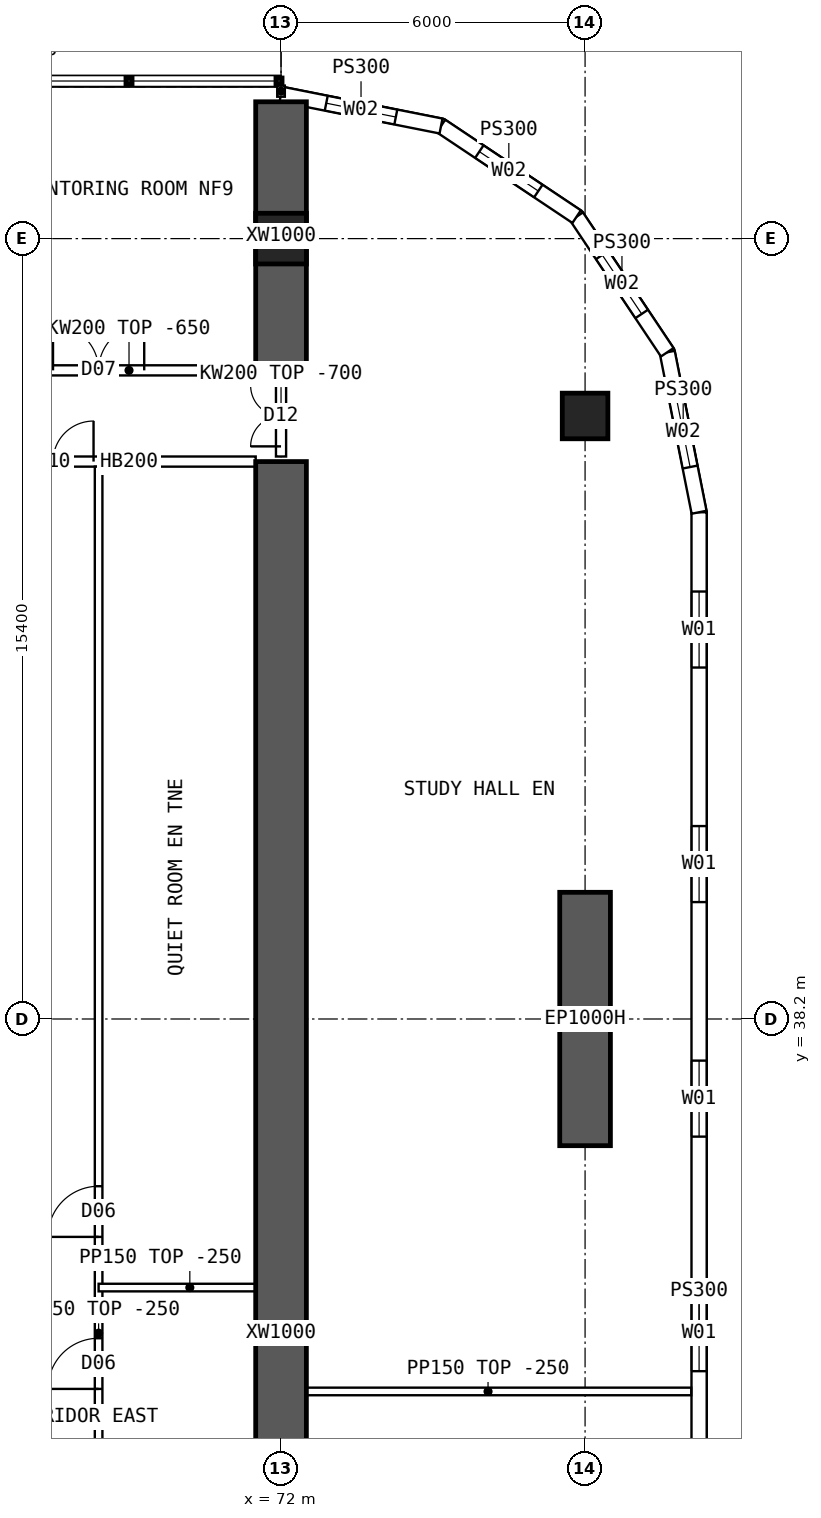
"""IFC4 building model, lengths in metres.
Left out: names, types, materials, properties, quantities, classifications, styles, units other than length and angle.
Written with IfcOpenShell. Run it as: python <this file> out.ifc"""

import sys

from ifc_helpers import new_model, si_unit, direction, frame, frame_2d, origin, origin_2d, place, context, subcontext, project, spatial, polyline, rectangle, hollow_rectangle, outline, extrude, element, fill, save


model = new_model("IFC4")
c1 = context("Model", 3, precision=1e-05, world=origin(), true_north=direction((0.0, 1.0)))
c2 = subcontext(c1, "Body", "Model", "MODEL_VIEW")
j1 = project(units=[si_unit("LENGTHUNIT", "METRE"), si_unit("PLANEANGLEUNIT", "RADIAN")], contexts=[c1])
p1 = place(None, origin())
s1 = spatial("IfcSite", under=j1, at=p1, CompositionType="ELEMENT")
p2 = place(p1, origin())
s2 = spatial("IfcBuilding", under=s1, at=p2, CompositionType="ELEMENT")
p3 = place(p2, frame((0.0, 0.0, 16.0)))
s3 = spatial("IfcBuildingStorey", under=s2, at=p3, CompositionType="ELEMENT", Elevation=16.0)
p4 = place(p3, frame((72.0, 53.6, 0.0), z_axis=(0.0, 0.0, 1.0), x_axis=(1.0, 0.0, 0.0)))
e1 = element("IfcColumn", 1, at=p4, inside=s3, PredefinedType="COLUMN", context=c2, shape_type="SweptSolid", body=[
    extrude(hollow_rectangle(XDim=1.0, YDim=1.0, WallThickness=0.1, at=origin_2d()), origin(), (0.0, 0.0, 1.0), 4.2),
])
p5 = place(p3, frame((78.0, 50.1, 0.0), z_axis=(0.0, 0.0, 1.0), x_axis=(1.0, 0.0, 0.0)))
e2 = element("IfcColumn", 2, at=p5, inside=s3, PredefinedType="COLUMN", context=c2, shape_type="SweptSolid", body=[
    extrude(hollow_rectangle(XDim=0.9, YDim=0.9, WallThickness=0.09, at=origin_2d()), origin(), (0.0, 0.0, 1.0), 4.2),
])
p6 = place(p3, frame((78.0, 35.7, 0.0), z_axis=(0.0, 0.0, 1.0), x_axis=(0.0, 1.0, 0.0)))
e3 = element("IfcWall", 3, at=p6, inside=s3, PredefinedType="SHEAR", context=c2, shape_type="SweptSolid", body=[
    extrude(rectangle(XDim=5.0, YDim=1.0, at=frame_2d((2.5, 0.0))), origin(), (0.0, 0.0, 1.0), 4.2),
])
p7 = place(p3, frame((72.0, 51.0, 0.0), z_axis=(0.0, 0.0, 1.0), x_axis=(0.0, 1.0, 0.0)))
e4 = element("IfcWall", 4, at=p7, inside=s3, PredefinedType="SHEAR", context=c2, shape_type="SweptSolid", body=[
    extrude(rectangle(XDim=5.3, YDim=1.0, at=frame_2d((2.65, 0.0))), origin(), (0.0, 0.0, 1.0), 4.2),
])
p8 = place(p3, frame((72.0, 14.8, 0.0), z_axis=(0.0, 0.0, 1.0), x_axis=(0.0, 1.0, 0.0)))
e5 = element("IfcWall", 5, at=p8, inside=s3, PredefinedType="SHEAR", context=c2, shape_type="SweptSolid", body=[
    extrude(rectangle(XDim=34.4, YDim=1.0, at=frame_2d((17.2, 0.0))), origin(), (0.0, 0.0, 1.0), 4.2),
])
p9 = place(p3, frame((80.25, 15.8, 0.0), z_axis=(0.0, 0.0, 1.0), x_axis=(0.0, 1.0, 0.0)))
e6 = element("IfcWall", 6, at=p9, inside=s3, PredefinedType="SOLIDWALL", context=c2, shape_type="SweptSolid", body=[
    extrude(outline(polyline([(-0.015, -0.15), (32.415, -0.15), (32.385, 0.15), (0.015, 0.15), (-0.015, -0.15)])), origin(), (0.0, 0.0, 1.0), 3.95),
])
p10 = place(p9, frame((1.564, 0.0, 0.9)))
e7 = element("IfcOpeningElement", 7, at=p10, cuts=e6, PredefinedType="OPENING", context=c2, shape_type="SweptSolid", body=[
    extrude(rectangle(XDim=1.5, YDim=2.0, at=frame_2d((0.75, 1.0))), frame((0.0, 0.16, 0.0), z_axis=(0.0, -1.0, 0.0), x_axis=(1.0, 0.0, 0.0)), (0.0, 0.0, 1.0), 0.32),
])
p11 = place(p9, frame((6.193, 0.0, 0.9)))
e8 = element("IfcOpeningElement", 8, at=p11, cuts=e6, PredefinedType="OPENING", context=c2, shape_type="SweptSolid", body=[
    extrude(rectangle(XDim=1.5, YDim=2.0, at=frame_2d((0.75, 1.0))), frame((0.0, 0.16, 0.0), z_axis=(0.0, -1.0, 0.0), x_axis=(1.0, 0.0, 0.0)), (0.0, 0.0, 1.0), 0.32),
])
p12 = place(p9, frame((10.822, 0.0, 0.9)))
e9 = element("IfcOpeningElement", 9, at=p12, cuts=e6, PredefinedType="OPENING", context=c2, shape_type="SweptSolid", body=[
    extrude(rectangle(XDim=1.5, YDim=2.0, at=frame_2d((0.75, 1.0))), frame((0.0, 0.16, 0.0), z_axis=(0.0, -1.0, 0.0), x_axis=(1.0, 0.0, 0.0)), (0.0, 0.0, 1.0), 0.32),
])
p13 = place(p9, frame((15.45, 0.0, 0.9)))
e10 = element("IfcOpeningElement", 10, at=p13, cuts=e6, PredefinedType="OPENING", context=c2, shape_type="SweptSolid", body=[
    extrude(rectangle(XDim=1.5, YDim=2.0, at=frame_2d((0.75, 1.0))), frame((0.0, 0.16, 0.0), z_axis=(0.0, -1.0, 0.0), x_axis=(1.0, 0.0, 0.0)), (0.0, 0.0, 1.0), 0.32),
])
p14 = place(p9, frame((20.079, 0.0, 0.9)))
e11 = element("IfcOpeningElement", 11, at=p14, cuts=e6, PredefinedType="OPENING", context=c2, shape_type="SweptSolid", body=[
    extrude(rectangle(XDim=1.5, YDim=2.0, at=frame_2d((0.75, 1.0))), frame((0.0, 0.16, 0.0), z_axis=(0.0, -1.0, 0.0), x_axis=(1.0, 0.0, 0.0)), (0.0, 0.0, 1.0), 0.32),
])
p15 = place(p9, frame((24.707, 0.0, 0.9)))
e12 = element("IfcOpeningElement", 12, at=p15, cuts=e6, PredefinedType="OPENING", context=c2, shape_type="SweptSolid", body=[
    extrude(rectangle(XDim=1.5, YDim=2.0, at=frame_2d((0.75, 1.0))), frame((0.0, 0.16, 0.0), z_axis=(0.0, -1.0, 0.0), x_axis=(1.0, 0.0, 0.0)), (0.0, 0.0, 1.0), 0.32),
])
p16 = place(p9, frame((29.336, 0.0, 0.9)))
e13 = element("IfcOpeningElement", 13, at=p16, cuts=e6, PredefinedType="OPENING", context=c2, shape_type="SweptSolid", body=[
    extrude(rectangle(XDim=1.5, YDim=2.0, at=frame_2d((0.75, 1.0))), frame((0.0, 0.16, 0.0), z_axis=(0.0, -1.0, 0.0), x_axis=(1.0, 0.0, 0.0)), (0.0, 0.0, 1.0), 0.32),
])
p17 = place(p9, frame((4.129, 0.0, 0.0)))
e14 = element("IfcOpeningElement", 14, at=p17, cuts=e6, PredefinedType="OPENING", context=c2, shape_type="SweptSolid", body=[
    extrude(rectangle(XDim=1.0, YDim=2.1, at=frame_2d((0.5, 1.05))), frame((0.0, 0.16, 0.0), z_axis=(0.0, -1.0, 0.0), x_axis=(1.0, 0.0, 0.0)), (0.0, 0.0, 1.0), 0.32),
])
p18 = place(p3, frame((80.25, 48.2, 0.0), z_axis=(0.0, 0.0, 1.0), x_axis=(-0.195065901187, 0.980790137692, 0.0)))
e15 = element("IfcWall", 15, at=p18, inside=s3, PredefinedType="SOLIDWALL", context=c2, shape_type="SweptSolid", body=[
    extrude(outline(polyline([(-0.015, -0.15), (3.249, -0.15), (3.189, 0.15), (0.015, 0.15), (-0.015, -0.15)])), origin(), (0.0, 0.0, 1.0), 3.95),
])
p19 = place(p18, frame((0.909, 0.0, 0.9)))
e16 = element("IfcOpeningElement", 16, at=p19, cuts=e15, PredefinedType="OPENING", context=c2, shape_type="SweptSolid", body=[
    extrude(rectangle(XDim=1.4, YDim=1.8, at=frame_2d((0.7, 0.9))), frame((0.0, 0.16, 0.0), z_axis=(0.0, -1.0, 0.0), x_axis=(1.0, 0.0, 0.0)), (0.0, 0.0, 1.0), 0.32),
])
p20 = place(p3, frame((79.622, 51.357, 0.0), z_axis=(0.0, 0.0, 1.0), x_axis=(-0.555609954424, 0.831443069936, 0.0)))
e17 = element("IfcWall", 17, at=p20, inside=s3, PredefinedType="SOLIDWALL", context=c2, shape_type="SweptSolid", body=[
    extrude(outline(polyline([(-0.03, -0.15), (3.249, -0.15), (3.189, 0.15), (0.03, 0.15), (-0.03, -0.15)])), origin(), (0.0, 0.0, 1.0), 3.95),
])
p21 = place(p20, frame((0.909, 0.0, 0.9)))
e18 = element("IfcOpeningElement", 18, at=p21, cuts=e17, PredefinedType="OPENING", context=c2, shape_type="SweptSolid", body=[
    extrude(rectangle(XDim=1.4, YDim=1.8, at=frame_2d((0.7, 0.9))), frame((0.0, 0.16, 0.0), z_axis=(0.0, -1.0, 0.0), x_axis=(1.0, 0.0, 0.0)), (0.0, 0.0, 1.0), 0.32),
])
p22 = place(p3, frame((77.833, 54.034, 0.0), z_axis=(0.0, 0.0, 1.0), x_axis=(-0.831478105043, 0.555557522525, 0.0)))
e19 = element("IfcWall", 19, at=p22, inside=s3, PredefinedType="SOLIDWALL", context=c2, shape_type="SweptSolid", body=[
    extrude(outline(polyline([(-0.03, -0.15), (3.249, -0.15), (3.189, 0.15), (0.03, 0.15), (-0.03, -0.15)])), origin(), (0.0, 0.0, 1.0), 3.95),
])
p23 = place(p22, frame((0.909, 0.0, 0.9)))
e20 = element("IfcOpeningElement", 20, at=p23, cuts=e19, PredefinedType="OPENING", context=c2, shape_type="SweptSolid", body=[
    extrude(rectangle(XDim=1.4, YDim=1.8, at=frame_2d((0.7, 0.9))), frame((0.0, 0.16, 0.0), z_axis=(0.0, -1.0, 0.0), x_axis=(1.0, 0.0, 0.0)), (0.0, 0.0, 1.0), 0.32),
])
p24 = place(p3, frame((75.157, 55.822, 0.0), z_axis=(0.0, 0.0, 1.0), x_axis=(-0.980787251524, 0.195080412259, 0.0)))
e21 = element("IfcWall", 21, at=p24, inside=s3, PredefinedType="SOLIDWALL", context=c2, shape_type="SweptSolid", body=[
    extrude(outline(polyline([(-0.03, -0.15), (3.249, -0.15), (3.189, 0.15), (0.03, 0.15), (-0.03, -0.15)])), origin(), (0.0, 0.0, 1.0), 3.95),
])
p25 = place(p24, frame((0.909, 0.0, 0.9)))
e22 = element("IfcOpeningElement", 22, at=p25, cuts=e21, PredefinedType="OPENING", context=c2, shape_type="SweptSolid", body=[
    extrude(rectangle(XDim=1.4, YDim=1.8, at=frame_2d((0.7, 0.9))), frame((0.0, 0.16, 0.0), z_axis=(0.0, -1.0, 0.0), x_axis=(1.0, 0.0, 0.0)), (0.0, 0.0, 1.0), 0.32),
])
p26 = place(p3, frame((66.5, 51.0, 0.0), z_axis=(0.0, 0.0, 1.0), x_axis=(1.0, 0.0, 0.0)))
e23 = element("IfcWall", 23, at=p26, inside=s3, PredefinedType="SOLIDWALL", context=c2, shape_type="SweptSolid", body=[
    extrude(outline(polyline([(0.0, 0.0), (5.0, 0.0), (5.0, 3.55), (0.0, 3.55), (0.0, 0.0)])), frame((0.0, 0.1, 0.0), z_axis=(0.0, -1.0, 0.0), x_axis=(1.0, 0.0, 0.0)), (0.0, 0.0, 1.0), 0.2),
])
p27 = place(p26, frame((1.0, 0.0, 0.0)))
e24 = element("IfcOpeningElement", 24, at=p27, cuts=e23, PredefinedType="OPENING", context=c2, shape_type="SweptSolid", body=[
    extrude(rectangle(XDim=1.8, YDim=2.1, at=frame_2d((0.9, 1.05))), frame((0.0, 0.11, 0.0), z_axis=(0.0, -1.0, 0.0), x_axis=(1.0, 0.0, 0.0)), (0.0, 0.0, 1.0), 0.22),
])
p28 = place(p3, frame((66.5, 49.2, 0.0), z_axis=(0.0, 0.0, 1.0), x_axis=(1.0, 0.0, 0.0)))
e25 = element("IfcWall", 25, at=p28, inside=s3, PredefinedType="SOLIDWALL", context=c2, shape_type="SweptSolid", body=[
    extrude(rectangle(XDim=5.0, YDim=0.2, at=frame_2d((2.5, 0.0))), origin(), (0.0, 0.0, 1.0), 3.95),
])
p29 = place(p28, frame((0.2, 0.0, 0.0)))
e26 = element("IfcOpeningElement", 26, at=p29, cuts=e25, PredefinedType="OPENING", context=c2, shape_type="SweptSolid", body=[
    extrude(rectangle(XDim=1.6, YDim=2.1, at=frame_2d((0.8, 1.05))), frame((0.0, 0.11, 0.0), z_axis=(0.0, -1.0, 0.0), x_axis=(1.0, 0.0, 0.0)), (0.0, 0.0, 1.0), 0.22),
])
p30 = place(p3, frame((68.4, 14.9, 0.0), z_axis=(0.0, 0.0, 1.0), x_axis=(0.0, 1.0, 0.0)))
e27 = element("IfcWall", 27, at=p30, inside=s3, PredefinedType="PARTITIONING", context=c2, shape_type="SweptSolid", body=[
    extrude(rectangle(XDim=34.2, YDim=0.15, at=frame_2d((17.1, 0.0))), origin(), (0.0, 0.0, 1.0), 3.95),
])
p31 = place(p30, frame((16.0, 0.0, 0.0)))
e28 = element("IfcOpeningElement", 28, at=p31, cuts=e27, PredefinedType="OPENING", context=c2, shape_type="SweptSolid", body=[
    extrude(rectangle(XDim=1.0, YDim=2.1, at=frame_2d((0.5, 1.05))), frame((0.0, 0.085, 0.0), z_axis=(0.0, -1.0, 0.0), x_axis=(1.0, 0.0, 0.0)), (0.0, 0.0, 1.0), 0.17),
])
p32 = place(p30, frame((19.0, 0.0, 0.0)))
e29 = element("IfcOpeningElement", 29, at=p32, cuts=e27, PredefinedType="OPENING", context=c2, shape_type="SweptSolid", body=[
    extrude(rectangle(XDim=1.0, YDim=2.1, at=frame_2d((0.5, 1.05))), frame((0.0, 0.085, 0.0), z_axis=(0.0, -1.0, 0.0), x_axis=(1.0, 0.0, 0.0)), (0.0, 0.0, 1.0), 0.17),
])
p33 = place(p3, frame((68.4, 32.9, 0.0), z_axis=(0.0, 0.0, 1.0), x_axis=(1.0, 0.0, 0.0)))
e30 = element("IfcWall", 30, at=p33, inside=s3, PredefinedType="PARTITIONING", context=c2, shape_type="SweptSolid", body=[
    extrude(rectangle(XDim=3.6, YDim=0.15, at=frame_2d((1.8, 0.0))), origin(), (0.0, 0.0, 1.0), 3.95),
])
p34 = place(p3, frame((72.075, 30.85, 0.0), z_axis=(0.0, 0.0, 1.0), x_axis=(1.0, 0.0, 0.0)))
e31 = element("IfcWall", 31, at=p34, inside=s3, PredefinedType="PARTITIONING", context=c2, shape_type="SweptSolid", body=[
    extrude(outline(polyline([(0.0, 0.0), (8.02, 0.0), (8.02, 3.95), (6.227, 3.95), (6.225, 3.5), (5.627, 3.5), (5.625, 3.95), (0.0, 3.95), (0.0, 0.0)])), frame((0.0, 0.075, 0.0), z_axis=(0.0, -1.0, 0.0), x_axis=(1.0, 0.0, 0.0)), (0.0, 0.0, 1.0), 0.15),
])
p35 = place(p3, frame((72.0, 49.3, 0.0), z_axis=(0.0, 0.0, 1.0), x_axis=(0.0, 1.0, 0.0)))
e32 = element("IfcWall", 32, at=p35, inside=s3, PredefinedType="SOLIDWALL", context=c2, shape_type="SweptSolid", body=[
    extrude(outline(polyline([(0.0, 0.0), (1.6, 0.0), (1.6, 3.5), (0.0, 3.5), (0.0, 0.0)])), frame((0.0, 0.1, 0.0), z_axis=(0.0, -1.0, 0.0), x_axis=(1.0, 0.0, 0.0)), (0.0, 0.0, 1.0), 0.2),
])
p36 = place(p35, frame((0.2, 0.0, 0.0)))
e33 = element("IfcOpeningElement", 33, at=p36, cuts=e32, PredefinedType="OPENING", context=c2, shape_type="SweptSolid", body=[
    extrude(rectangle(XDim=1.2, YDim=2.1, at=frame_2d((0.6, 1.05))), frame((0.0, 0.11, 0.0), z_axis=(0.0, -1.0, 0.0), x_axis=(1.0, 0.0, 0.0)), (0.0, 0.0, 1.0), 0.22),
])
p37 = place(p3, frame((72.0, 56.4, 0.0), z_axis=(0.0, 0.0, 1.0), x_axis=(0.0, 1.0, 0.0)))
e34 = element("IfcWall", 34, at=p37, inside=s3, PredefinedType="PARTITIONING", context=c2, shape_type="SweptSolid", body=[
    extrude(rectangle(XDim=0.22, YDim=0.15, at=frame_2d((0.11, 0.0))), origin(), (0.0, 0.0, 1.0), 3.95),
])
p38 = place(p13, origin())
e35 = element("IfcWindow", 35, at=p38, inside=s3, PartitioningType="SINGLE_PANEL", PredefinedType="WINDOW", context=c2, shape_type="SweptSolid", body=[
    extrude(rectangle(XDim=1.5, YDim=2.0, at=frame_2d((0.75, 1.0))), frame((0.0, 0.03, 0.0), z_axis=(0.0, -1.0, 0.0), x_axis=(1.0, 0.0, 0.0)), (0.0, 0.0, 1.0), 0.06),
])
fill(e10, e35)
p39 = place(p14, origin())
e36 = element("IfcWindow", 36, at=p39, inside=s3, PartitioningType="SINGLE_PANEL", PredefinedType="WINDOW", context=c2, shape_type="SweptSolid", body=[
    extrude(rectangle(XDim=1.5, YDim=2.0, at=frame_2d((0.75, 1.0))), frame((0.0, 0.03, 0.0), z_axis=(0.0, -1.0, 0.0), x_axis=(1.0, 0.0, 0.0)), (0.0, 0.0, 1.0), 0.06),
])
fill(e11, e36)
p40 = place(p15, origin())
e37 = element("IfcWindow", 37, at=p40, inside=s3, PartitioningType="SINGLE_PANEL", PredefinedType="WINDOW", context=c2, shape_type="SweptSolid", body=[
    extrude(rectangle(XDim=1.5, YDim=2.0, at=frame_2d((0.75, 1.0))), frame((0.0, 0.03, 0.0), z_axis=(0.0, -1.0, 0.0), x_axis=(1.0, 0.0, 0.0)), (0.0, 0.0, 1.0), 0.06),
])
fill(e12, e37)
p41 = place(p16, origin())
e38 = element("IfcWindow", 38, at=p41, inside=s3, PartitioningType="SINGLE_PANEL", PredefinedType="WINDOW", context=c2, shape_type="SweptSolid", body=[
    extrude(rectangle(XDim=1.5, YDim=2.0, at=frame_2d((0.75, 1.0))), frame((0.0, 0.03, 0.0), z_axis=(0.0, -1.0, 0.0), x_axis=(1.0, 0.0, 0.0)), (0.0, 0.0, 1.0), 0.06),
])
fill(e13, e38)
p42 = place(p19, origin())
e39 = element("IfcWindow", 39, at=p42, inside=s3, PartitioningType="SINGLE_PANEL", PredefinedType="WINDOW", context=c2, shape_type="SweptSolid", body=[
    extrude(rectangle(XDim=1.4, YDim=1.8, at=frame_2d((0.7, 0.9))), frame((0.0, 0.03, 0.0), z_axis=(0.0, -1.0, 0.0), x_axis=(1.0, 0.0, 0.0)), (0.0, 0.0, 1.0), 0.06),
])
fill(e16, e39)
p43 = place(p21, origin())
e40 = element("IfcWindow", 40, at=p43, inside=s3, PartitioningType="SINGLE_PANEL", PredefinedType="WINDOW", context=c2, shape_type="SweptSolid", body=[
    extrude(rectangle(XDim=1.4, YDim=1.8, at=frame_2d((0.7, 0.9))), frame((0.0, 0.03, 0.0), z_axis=(0.0, -1.0, 0.0), x_axis=(1.0, 0.0, 0.0)), (0.0, 0.0, 1.0), 0.06),
])
fill(e18, e40)
p44 = place(p23, origin())
e41 = element("IfcWindow", 41, at=p44, inside=s3, PartitioningType="SINGLE_PANEL", PredefinedType="WINDOW", context=c2, shape_type="SweptSolid", body=[
    extrude(rectangle(XDim=1.4, YDim=1.8, at=frame_2d((0.7, 0.9))), frame((0.0, 0.03, 0.0), z_axis=(0.0, -1.0, 0.0), x_axis=(1.0, 0.0, 0.0)), (0.0, 0.0, 1.0), 0.06),
])
fill(e20, e41)
p45 = place(p25, origin())
e42 = element("IfcWindow", 42, at=p45, inside=s3, PartitioningType="SINGLE_PANEL", PredefinedType="WINDOW", context=c2, shape_type="SweptSolid", body=[
    extrude(rectangle(XDim=1.4, YDim=1.8, at=frame_2d((0.7, 0.9))), frame((0.0, 0.03, 0.0), z_axis=(0.0, -1.0, 0.0), x_axis=(1.0, 0.0, 0.0)), (0.0, 0.0, 1.0), 0.06),
])
fill(e22, e42)
p46 = place(p29, origin())
e43 = element("IfcDoor", 43, at=p46, inside=s3, OperationType="DOUBLE_DOOR_SINGLE_SWING", PredefinedType="DOOR", context=c2, shape_type="SweptSolid", body=[
    extrude(rectangle(XDim=1.6, YDim=2.1, at=frame_2d((0.8, 1.05))), frame((0.0, 0.025, 0.0), z_axis=(0.0, -1.0, 0.0), x_axis=(1.0, 0.0, 0.0)), (0.0, 0.0, 1.0), 0.05),
])
fill(e26, e43)
p47 = place(p27, origin())
e44 = element("IfcDoor", 44, at=p47, inside=s3, OperationType="DOUBLE_DOOR_SINGLE_SWING", PredefinedType="DOOR", context=c2, shape_type="SweptSolid", body=[
    extrude(rectangle(XDim=1.8, YDim=2.1, at=frame_2d((0.9, 1.05))), frame((0.0, 0.025, 0.0), z_axis=(0.0, -1.0, 0.0), x_axis=(1.0, 0.0, 0.0)), (0.0, 0.0, 1.0), 0.05),
])
fill(e24, e44)
p48 = place(p31, origin())
e45 = element("IfcDoor", 45, at=p48, inside=s3, OperationType="SINGLE_SWING_LEFT", PredefinedType="DOOR", context=c2, shape_type="SweptSolid", body=[
    extrude(rectangle(XDim=1.0, YDim=2.1, at=frame_2d((0.5, 1.05))), frame((0.0, 0.025, 0.0), z_axis=(0.0, -1.0, 0.0), x_axis=(1.0, 0.0, 0.0)), (0.0, 0.0, 1.0), 0.05),
])
fill(e28, e45)
p49 = place(p32, origin())
e46 = element("IfcDoor", 46, at=p49, inside=s3, OperationType="SINGLE_SWING_LEFT", PredefinedType="DOOR", context=c2, shape_type="SweptSolid", body=[
    extrude(rectangle(XDim=1.0, YDim=2.1, at=frame_2d((0.5, 1.05))), frame((0.0, 0.025, 0.0), z_axis=(0.0, -1.0, 0.0), x_axis=(1.0, 0.0, 0.0)), (0.0, 0.0, 1.0), 0.05),
])
fill(e29, e46)
p50 = place(p36, origin())
e47 = element("IfcDoor", 47, at=p50, inside=s3, OperationType="DOUBLE_DOOR_SINGLE_SWING", PredefinedType="DOOR", context=c2, shape_type="SweptSolid", body=[
    extrude(rectangle(XDim=1.2, YDim=2.1, at=frame_2d((0.6, 1.05))), frame((0.0, 0.025, 0.0), z_axis=(0.0, -1.0, 0.0), x_axis=(1.0, 0.0, 0.0)), (0.0, 0.0, 1.0), 0.05),
])
fill(e33, e47)
save(model, sys.argv[1])
